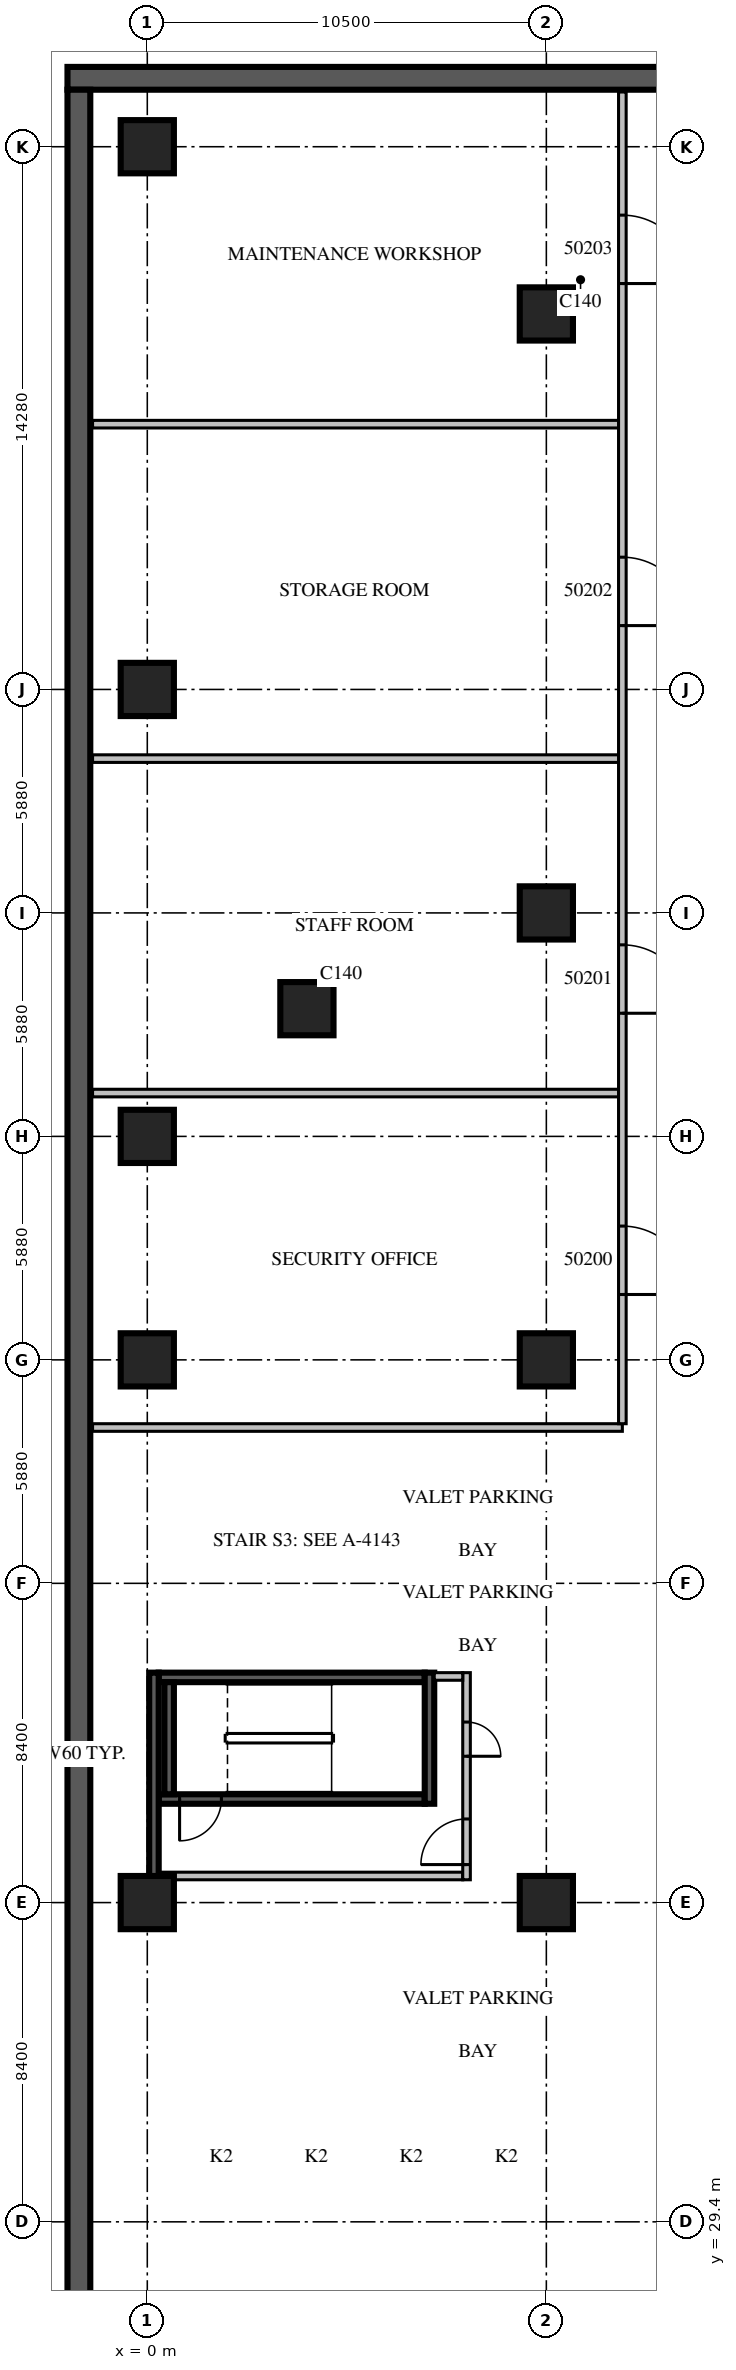
"""IFC4 building model, lengths in metres.
Left out: names, types, materials, properties, quantities, classifications, styles, units other than length and angle.
Written with IfcOpenShell. Run it as: python <this file> out.ifc"""

import sys

from ifc_helpers import new_model, si_unit, direction, frame, frame_2d, origin, origin_2d, place, context, subcontext, project, spatial, rectangle, extrude, source, transform, mapped, element, fill, save


model = new_model("IFC4")
c1 = context("Model", 3, precision=1e-05, world=origin(), true_north=direction((0.0, 1.0)))
c2 = subcontext(c1, "Body", "Model", "MODEL_VIEW")
j1 = project(units=[si_unit("LENGTHUNIT", "METRE"), si_unit("PLANEANGLEUNIT", "RADIAN")], contexts=[c1])
p1 = place(None, origin())
s1 = spatial("IfcSite", under=j1, at=p1, CompositionType="ELEMENT")
p2 = place(p1, origin())
s2 = spatial("IfcBuilding", under=s1, at=p2, CompositionType="ELEMENT")
p3 = place(p2, frame((0.0, 0.0, -4.5)))
s3 = spatial("IfcBuildingStorey", under=s2, at=p3, CompositionType="ELEMENT", Elevation=-4.5)
m1 = source(origin(), c2, "Body", "SweptSolid", [
    extrude(rectangle(XDim=55.68, YDim=0.6, at=frame_2d((27.84, 0.0))), origin(), (0.0, 0.0, 1.0), 4.5),
])
p4 = place(p3, frame((53.58, 85.8, 0.0), z_axis=(0.0, 0.0, 1.0), x_axis=(-1.0, 0.0, 0.0)))
e1 = element("IfcWall", 1, at=p4, inside=s3, PredefinedType="SOLIDWALL", context=c2, shape_type="MappedRepresentation", body=[
    mapped(m1, transform((0.0, 0.0, 0.0), scale=1.0)),
])
m2 = source(origin(), c2, "Body", "SweptSolid", [
    extrude(rectangle(XDim=87.6, YDim=0.6, at=frame_2d((43.8, 0.0))), origin(), (0.0, 0.0, 1.0), 4.5),
])
p5 = place(p3, frame((-1.8, 85.5, 0.0), z_axis=(0.0, 0.0, 1.0), x_axis=(0.0, -1.0, 0.0)))
e2 = element("IfcWall", 2, at=p5, inside=s3, PredefinedType="SOLIDWALL", context=c2, shape_type="MappedRepresentation", body=[
    mapped(m2, transform((0.0, 0.0, 0.0), scale=1.0)),
])
m3 = source(origin(), c2, "Body", "SweptSolid", [
    extrude(rectangle(XDim=1.4, YDim=1.4, at=origin_2d()), origin(), (0.0, 0.0, 1.0), 4.5),
])
for number, where, z_axis, x_axis in (
    (3, (0.0, 37.8, 0.0), (0.0, 0.0, 1.0), (1.0, 0.0, 0.0)),
    (4, (0.0, 52.08, 0.0), (0.0, 0.0, 1.0), (1.0, 0.0, 0.0)),
    (5, (0.0, 57.96, 0.0), (0.0, 0.0, 1.0), (1.0, 0.0, 0.0)),
    (6, (0.0, 69.72, 0.0), (0.0, 0.0, 1.0), (1.0, 0.0, 0.0)),
    (7, (0.0, 84.0, 0.0), (0.0, 0.0, 1.0), (1.0, 0.0, 0.0)),
    (8, (4.2, 61.32, 0.0), (0.0, 0.0, 1.0), (1.0, 0.0, 0.0)),
    (9, (10.5, 37.8, 0.0), (0.0, 0.0, 1.0), (1.0, 0.0, 0.0)),
    (10, (10.5, 52.08, 0.0), (0.0, 0.0, 1.0), (1.0, 0.0, 0.0)),
    (11, (10.5, 63.84, 0.0), (0.0, 0.0, 1.0), (1.0, 0.0, 0.0)),
    (12, (10.5, 79.6, 0.0), (0.0, 0.0, 1.0), (1.0, 0.0, 0.0)),
):
    element("IfcColumn", number, at=place(p3, frame(where, z_axis=z_axis, x_axis=x_axis)), inside=s3, PredefinedType="COLUMN", context=c2, shape_type="MappedRepresentation", body=[
        mapped(m3, transform((0.0, 0.0, 0.0), scale=1.0)),
    ])
m4 = source(origin(), c2, "Body", "SweptSolid", [
    extrude(rectangle(XDim=7.0, YDim=0.25, at=frame_2d((3.5, 0.0))), origin(), (0.0, 0.0, 1.0), 3.9),
])
p6 = place(p3, frame((0.3, 40.525, 0.0), z_axis=(0.0, 0.0, 1.0), x_axis=(1.0, 0.0, 0.0)))
e13 = element("IfcWall", 13, at=p6, inside=s3, PredefinedType="SOLIDWALL", context=c2, shape_type="MappedRepresentation", body=[
    mapped(m4, transform((0.0, 0.0, 0.0), scale=1.0)),
])
m5 = source(origin(), c2, "Body", "SweptSolid", [
    extrude(rectangle(XDim=1.1, YDim=2.1, at=frame_2d((0.55, 1.05))), frame((0.0, 0.135, 0.0), z_axis=(0.0, -1.0, 0.0), x_axis=(1.0, 0.0, 0.0)), (0.0, 0.0, 1.0), 0.27),
])
p7 = place(p6, frame((0.55, 0.0, 0.0)))
e14 = element("IfcOpeningElement", 14, at=p7, cuts=e13, PredefinedType="OPENING", context=c2, shape_type="MappedRepresentation", body=[
    mapped(m5, transform((0.0, 0.0, 0.0), scale=1.0)),
])
p8 = place(p3, frame((0.3, 43.725, 0.0), z_axis=(0.0, 0.0, 1.0), x_axis=(1.0, 0.0, 0.0)))
e15 = element("IfcWall", 15, at=p8, inside=s3, PredefinedType="SOLIDWALL", context=c2, shape_type="MappedRepresentation", body=[
    mapped(m4, transform((0.0, 0.0, 0.0), scale=1.0)),
])
m6 = source(origin(), c2, "Body", "SweptSolid", [
    extrude(rectangle(XDim=3.45, YDim=0.25, at=frame_2d((1.725, 0.0))), origin(), (0.0, 0.0, 1.0), 3.9),
])
p9 = place(p3, frame((7.425, 40.4, 0.0), z_axis=(0.0, 0.0, 1.0), x_axis=(0.0, 1.0, 0.0)))
e16 = element("IfcWall", 16, at=p9, inside=s3, PredefinedType="SOLIDWALL", context=c2, shape_type="MappedRepresentation", body=[
    mapped(m6, transform((0.0, 0.0, 0.0), scale=1.0)),
])
m7 = source(origin(), c2, "Body", "SweptSolid", [
    extrude(rectangle(XDim=2.95, YDim=0.25, at=frame_2d((1.475, 0.0))), origin(), (0.0, 0.0, 1.0), 3.9),
])
p10 = place(p3, frame((0.575, 40.65, 0.0), z_axis=(0.0, 0.0, 1.0), x_axis=(0.0, 1.0, 0.0)))
e17 = element("IfcWall", 17, at=p10, inside=s3, PredefinedType="SOLIDWALL", context=c2, shape_type="MappedRepresentation", body=[
    mapped(m7, transform((0.0, 0.0, 0.0), scale=1.0)),
])
m8 = source(origin(), c2, "Body", "SweptSolid", [
    extrude(rectangle(XDim=8.0, YDim=0.2, at=frame_2d((4.0, 0.0))), origin(), (0.0, 0.0, 1.0), 3.9),
])
p11 = place(p3, frame((0.3, 38.5, 0.0), z_axis=(0.0, 0.0, 1.0), x_axis=(1.0, 0.0, 0.0)))
e18 = element("IfcWall", 18, at=p11, inside=s3, PredefinedType="PARTITIONING", context=c2, shape_type="MappedRepresentation", body=[
    mapped(m8, transform((0.0, 0.0, 0.0), scale=1.0)),
])
m9 = source(origin(), c2, "Body", "SweptSolid", [
    extrude(rectangle(XDim=5.45, YDim=0.2, at=frame_2d((2.725, 0.0))), origin(), (0.0, 0.0, 1.0), 3.9),
])
p12 = place(p3, frame((8.4, 38.4, 0.0), z_axis=(0.0, 0.0, 1.0), x_axis=(0.0, 1.0, 0.0)))
e19 = element("IfcWall", 19, at=p12, inside=s3, PredefinedType="PARTITIONING", context=c2, shape_type="MappedRepresentation", body=[
    mapped(m9, transform((0.0, 0.0, 0.0), scale=1.0)),
])
m10 = source(origin(), c2, "Body", "SweptSolid", [
    extrude(rectangle(XDim=1.2, YDim=2.1, at=frame_2d((0.6, 1.05))), frame((0.0, 0.11, 0.0), z_axis=(0.0, -1.0, 0.0), x_axis=(1.0, 0.0, 0.0)), (0.0, 0.0, 1.0), 0.22),
])
p13 = place(p12, frame((0.4, 0.0, 0.0)))
e20 = element("IfcOpeningElement", 20, at=p13, cuts=e19, PredefinedType="OPENING", context=c2, shape_type="MappedRepresentation", body=[
    mapped(m10, transform((0.0, 0.0, 0.0), scale=1.0)),
])
m11 = source(origin(), c2, "Body", "SweptSolid", [
    extrude(rectangle(XDim=0.9, YDim=2.1, at=frame_2d((0.45, 1.05))), frame((0.0, 0.11, 0.0), z_axis=(0.0, -1.0, 0.0), x_axis=(1.0, 0.0, 0.0)), (0.0, 0.0, 1.0), 0.22),
])
p14 = place(p12, frame((3.25, 0.0, 0.0)))
e21 = element("IfcOpeningElement", 21, at=p14, cuts=e19, PredefinedType="OPENING", context=c2, shape_type="MappedRepresentation", body=[
    mapped(m11, transform((0.0, 0.0, 0.0), scale=1.0)),
])
m12 = source(origin(), c2, "Body", "SweptSolid", [
    extrude(rectangle(XDim=0.75, YDim=0.2, at=frame_2d((0.375, 0.0))), origin(), (0.0, 0.0, 1.0), 3.9),
])
p15 = place(p3, frame((7.55, 43.75, 0.0), z_axis=(0.0, 0.0, 1.0), x_axis=(1.0, 0.0, 0.0)))
e22 = element("IfcWall", 22, at=p15, inside=s3, PredefinedType="PARTITIONING", context=c2, shape_type="MappedRepresentation", body=[
    mapped(m12, transform((0.0, 0.0, 0.0), scale=1.0)),
])
m13 = source(origin(), c2, "Body", "SweptSolid", [
    extrude(rectangle(XDim=5.45, YDim=0.25, at=frame_2d((2.725, 0.0))), origin(), (0.0, 0.0, 1.0), 3.9),
])
p16 = place(p3, frame((0.175, 38.4, 0.0), z_axis=(0.0, 0.0, 1.0), x_axis=(0.0, 1.0, 0.0)))
e23 = element("IfcWall", 23, at=p16, inside=s3, PredefinedType="SOLIDWALL", context=c2, shape_type="MappedRepresentation", body=[
    mapped(m13, transform((0.0, 0.0, 0.0), scale=1.0)),
])
m14 = source(origin(), c2, "Body", "SweptSolid", [
    extrude(rectangle(XDim=13.94, YDim=0.2, at=frame_2d((6.97, 0.0))), origin(), (0.0, 0.0, 1.0), 3.9),
])
for number, where, z_axis, x_axis in (
    (24, (-1.44, 50.3, 0.0), (0.0, 0.0, 1.0), (1.0, 0.0, 0.0)),
    (25, (-1.44, 59.1, 0.0), (0.0, 0.0, 1.0), (1.0, 0.0, 0.0)),
    (26, (-1.44, 67.9, 0.0), (0.0, 0.0, 1.0), (1.0, 0.0, 0.0)),
    (27, (-1.44, 76.7, 0.0), (0.0, 0.0, 1.0), (1.0, 0.0, 0.0)),
):
    element("IfcWall", number, at=place(p3, frame(where, z_axis=z_axis, x_axis=x_axis)), inside=s3, PredefinedType="PARTITIONING", context=c2, shape_type="MappedRepresentation", body=[
        mapped(m14, transform((0.0, 0.0, 0.0), scale=1.0)),
    ])
m15 = source(origin(), c2, "Body", "SweptSolid", [
    extrude(rectangle(XDim=35.04, YDim=0.2, at=frame_2d((17.52, 0.0))), origin(), (0.0, 0.0, 1.0), 3.9),
])
p17 = place(p3, frame((12.5, 50.4, 0.0), z_axis=(0.0, 0.0, 1.0), x_axis=(0.0, 1.0, 0.0)))
e28 = element("IfcWall", 28, at=p17, inside=s3, PredefinedType="PARTITIONING", context=c2, shape_type="MappedRepresentation", body=[
    mapped(m15, transform((0.0, 0.0, 0.0), scale=1.0)),
])
p18 = place(p17, frame((3.4, 0.0, 0.0)))
e29 = element("IfcOpeningElement", 29, at=p18, cuts=e28, PredefinedType="OPENING", context=c2, shape_type="SweptSolid", body=[
    extrude(rectangle(XDim=1.8, YDim=2.1, at=frame_2d((0.9, 1.05))), frame((0.0, 0.11, 0.0), z_axis=(0.0, -1.0, 0.0), x_axis=(1.0, 0.0, 0.0)), (0.0, 0.0, 1.0), 0.22),
])
m16 = source(origin(), c2, "Body", "SweptSolid", [
    extrude(rectangle(XDim=1.8, YDim=2.1, at=frame_2d((0.9, 1.05))), frame((0.0, 0.11, 0.0), z_axis=(0.0, -1.0, 0.0), x_axis=(1.0, 0.0, 0.0)), (0.0, 0.0, 1.0), 0.22),
])
p19 = place(p17, frame((10.8, 0.0, 0.0)))
e30 = element("IfcOpeningElement", 30, at=p19, cuts=e28, PredefinedType="OPENING", context=c2, shape_type="MappedRepresentation", body=[
    mapped(m16, transform((0.0, 0.0, 0.0), scale=1.0)),
])
p20 = place(p17, frame((21.0, 0.0, 0.0)))
e31 = element("IfcOpeningElement", 31, at=p20, cuts=e28, PredefinedType="OPENING", context=c2, shape_type="MappedRepresentation", body=[
    mapped(m16, transform((0.0, 0.0, 0.0), scale=1.0)),
])
p21 = place(p17, frame((30.0, 0.0, 0.0)))
e32 = element("IfcOpeningElement", 32, at=p21, cuts=e28, PredefinedType="OPENING", context=c2, shape_type="MappedRepresentation", body=[
    mapped(m16, transform((0.0, 0.0, 0.0), scale=1.0)),
])
m17 = source(origin(), c2, "Body", "SweptSolid", [
    extrude(rectangle(XDim=1.1, YDim=2.1, at=frame_2d((0.55, 1.05))), frame((0.0, 0.025, 0.0), z_axis=(0.0, -1.0, 0.0), x_axis=(1.0, 0.0, 0.0)), (0.0, 0.0, 1.0), 0.05),
])
p22 = place(p7, origin())
e33 = element("IfcDoor", 33, at=p22, inside=s3, OperationType="SINGLE_SWING_RIGHT", PredefinedType="DOOR", context=c2, shape_type="MappedRepresentation", body=[
    mapped(m17, transform((0.0, 0.0, 0.0), scale=1.0)),
])
fill(e14, e33)
m18 = source(origin(), c2, "Body", "SweptSolid", [
    extrude(rectangle(XDim=1.2, YDim=2.1, at=frame_2d((0.6, 1.05))), frame((0.0, 0.025, 0.0), z_axis=(0.0, -1.0, 0.0), x_axis=(1.0, 0.0, 0.0)), (0.0, 0.0, 1.0), 0.05),
])
p23 = place(p13, origin())
e34 = element("IfcDoor", 34, at=p23, inside=s3, OperationType="SINGLE_SWING_LEFT", PredefinedType="DOOR", context=c2, shape_type="MappedRepresentation", body=[
    mapped(m18, transform((0.0, 0.0, 0.0), scale=1.0)),
])
fill(e20, e34)
m19 = source(origin(), c2, "Body", "SweptSolid", [
    extrude(rectangle(XDim=0.9, YDim=2.1, at=frame_2d((0.45, 1.05))), frame((0.0, 0.025, 0.0), z_axis=(0.0, -1.0, 0.0), x_axis=(1.0, 0.0, 0.0)), (0.0, 0.0, 1.0), 0.05),
])
p24 = place(p14, origin())
e35 = element("IfcDoor", 35, at=p24, inside=s3, OperationType="SINGLE_SWING_RIGHT", PredefinedType="DOOR", context=c2, shape_type="MappedRepresentation", body=[
    mapped(m19, transform((0.0, 0.0, 0.0), scale=1.0)),
])
fill(e21, e35)
m20 = source(origin(), c2, "Body", "SweptSolid", [
    extrude(rectangle(XDim=1.8, YDim=2.1, at=frame_2d((0.9, 1.05))), frame((0.0, 0.025, 0.0), z_axis=(0.0, -1.0, 0.0), x_axis=(1.0, 0.0, 0.0)), (0.0, 0.0, 1.0), 0.05),
])
p25 = place(p18, origin())
e36 = element("IfcDoor", 36, at=p25, inside=s3, OperationType="DOUBLE_DOOR_SINGLE_SWING", PredefinedType="DOOR", context=c2, shape_type="MappedRepresentation", body=[
    mapped(m20, transform((0.0, 0.0, 0.0), scale=1.0)),
])
fill(e29, e36)
p26 = place(p19, origin())
e37 = element("IfcDoor", 37, at=p26, inside=s3, OperationType="DOUBLE_DOOR_SINGLE_SWING", PredefinedType="DOOR", context=c2, shape_type="MappedRepresentation", body=[
    mapped(m20, transform((0.0, 0.0, 0.0), scale=1.0)),
])
fill(e30, e37)
p27 = place(p20, origin())
e38 = element("IfcDoor", 38, at=p27, inside=s3, OperationType="DOUBLE_DOOR_SINGLE_SWING", PredefinedType="DOOR", context=c2, shape_type="MappedRepresentation", body=[
    mapped(m20, transform((0.0, 0.0, 0.0), scale=1.0)),
])
fill(e31, e38)
p28 = place(p21, origin())
e39 = element("IfcDoor", 39, at=p28, inside=s3, OperationType="DOUBLE_DOOR_SINGLE_SWING", PredefinedType="DOOR", context=c2, shape_type="MappedRepresentation", body=[
    mapped(m20, transform((0.0, 0.0, 0.0), scale=1.0)),
])
fill(e32, e39)
save(model, sys.argv[1])
